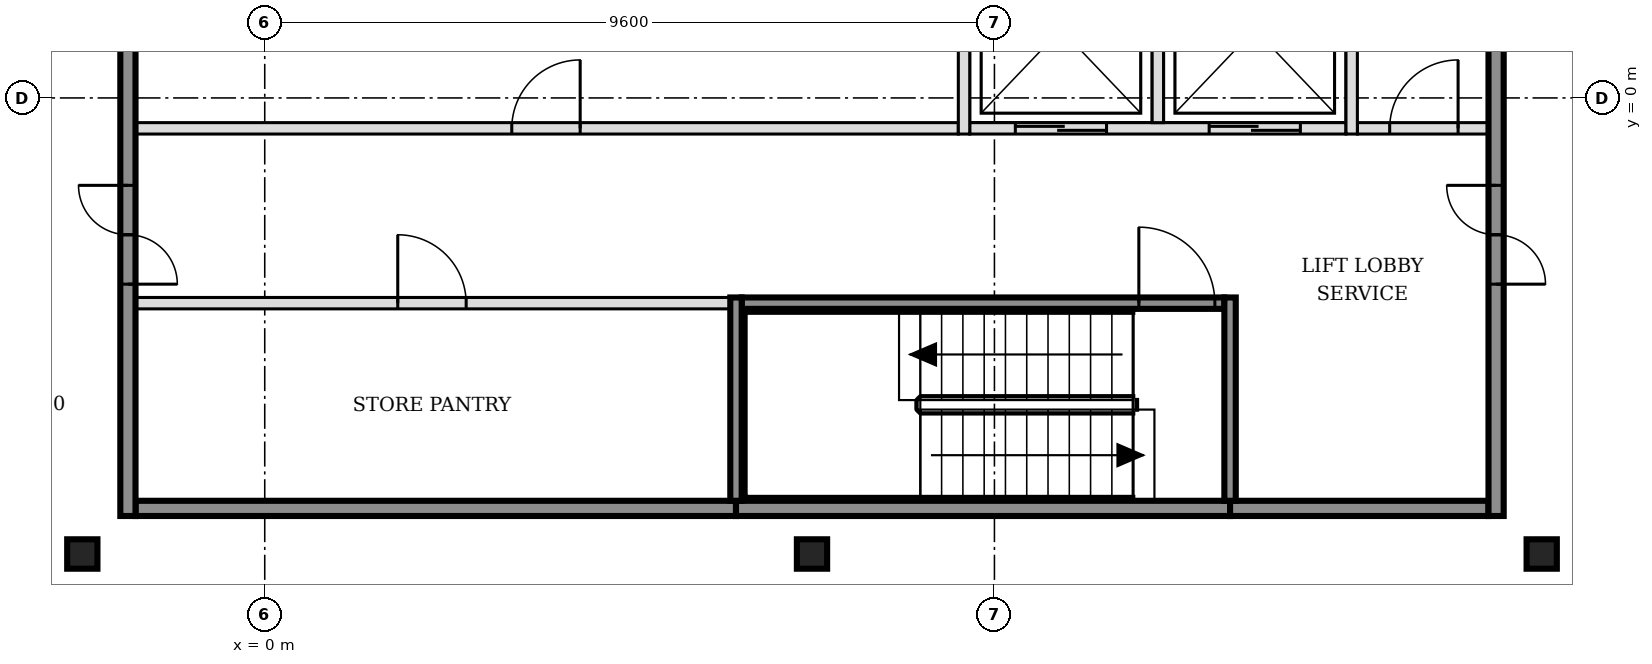
"""IFC4 building model, lengths in metres.
Left out: names, types, materials, properties, quantities, classifications, styles, units other than length and angle.
Written with IfcOpenShell. Run it as: python <this file> out.ifc"""

import sys

from ifc_helpers import new_model, si_unit, direction, frame, frame_2d, origin, origin_2d, place, context, subcontext, project, spatial, rectangle, i_section, extrude, element, fill, save


model = new_model("IFC4")
c1 = context("Model", 3, precision=1e-05, world=origin(), true_north=direction((0.0, 1.0)))
c2 = subcontext(c1, "Body", "Model", "MODEL_VIEW")
j1 = project(units=[si_unit("LENGTHUNIT", "METRE"), si_unit("PLANEANGLEUNIT", "RADIAN")], contexts=[c1])
p1 = place(None, origin())
s1 = spatial("IfcSite", under=j1, at=p1, CompositionType="ELEMENT")
p2 = place(p1, origin())
s2 = spatial("IfcBuilding", under=s1, at=p2, CompositionType="ELEMENT")
p3 = place(p2, frame((0.0, 0.0, 250.2)))
s3 = spatial("IfcBuildingStorey", under=s2, at=p3, CompositionType="ELEMENT", Elevation=250.2)
for number, where, z_axis, x_axis in (
    (1, (-2.4, -6.0, -0.15), (0.0, 0.0, 1.0), (1.0, 0.0, 0.0)),
    (2, (7.2, -6.0, -0.15), (0.0, 0.0, 1.0), (1.0, 0.0, 0.0)),
    (3, (16.8, -6.0, -0.15), (0.0, 0.0, 1.0), (1.0, 0.0, 0.0)),
):
    element("IfcColumn", number, at=place(p3, frame(where, z_axis=z_axis, x_axis=x_axis)), inside=s3, PredefinedType="COLUMN", context=c2, shape_type="SweptSolid", body=[
        extrude(i_section(OverallWidth=0.398, OverallDepth=0.387, WebThickness=0.021, FlangeThickness=0.033, FilletRadius=0.015, at=origin_2d()), origin(), (0.0, 0.0, 1.0), 3.6),
    ])
p4 = place(p3, frame((-1.7, -5.4, 0.0), z_axis=(0.0, 0.0, 1.0), x_axis=(1.0, 0.0, 0.0)))
e4 = element("IfcWall", 4, at=p4, inside=s3, PredefinedType="SOLIDWALL", context=c2, shape_type="SweptSolid", body=[
    extrude(rectangle(XDim=7.9, YDim=0.2, at=frame_2d((3.95, 0.0))), origin(), (0.0, 0.0, 1.0), 3.45),
])
p5 = place(p3, frame((6.2, -5.4, 0.0), z_axis=(0.0, 0.0, 1.0), x_axis=(1.0, 0.0, 0.0)))
e5 = element("IfcWall", 5, at=p5, inside=s3, PredefinedType="SOLIDWALL", context=c2, shape_type="SweptSolid", body=[
    extrude(rectangle(XDim=6.5, YDim=0.2, at=frame_2d((3.25, 0.0))), origin(), (0.0, 0.0, 1.0), 3.45),
])
p6 = place(p3, frame((12.7, -5.4, 0.0), z_axis=(0.0, 0.0, 1.0), x_axis=(1.0, 0.0, 0.0)))
e6 = element("IfcWall", 6, at=p6, inside=s3, PredefinedType="SOLIDWALL", context=c2, shape_type="SweptSolid", body=[
    extrude(rectangle(XDim=3.4, YDim=0.2, at=frame_2d((1.7, 0.0))), origin(), (0.0, 0.0, 1.0), 3.45),
])
p7 = place(p3, frame((-1.7, -2.7, 0.0), z_axis=(0.0, 0.0, 1.0), x_axis=(1.0, 0.0, 0.0)))
e7 = element("IfcWall", 7, at=p7, inside=s3, PredefinedType="PARTITIONING", context=c2, shape_type="SweptSolid", body=[
    extrude(rectangle(XDim=7.825, YDim=0.15, at=frame_2d((3.913, 0.0))), origin(), (0.0, 0.0, 1.0), 3.45),
])
p8 = place(p7, frame((3.45, 0.0, 0.0)))
e8 = element("IfcOpeningElement", 8, at=p8, cuts=e7, PredefinedType="OPENING", context=c2, shape_type="SweptSolid", body=[
    extrude(rectangle(XDim=0.9, YDim=2.1, at=frame_2d((0.45, 1.05))), frame((0.0, 0.085, 0.0), z_axis=(0.0, -1.0, 0.0), x_axis=(1.0, 0.0, 0.0)), (0.0, 0.0, 1.0), 0.17),
])
p9 = place(p3, frame((6.275, -2.7, 0.0), z_axis=(0.0, 0.0, 1.0), x_axis=(1.0, 0.0, 0.0)))
e9 = element("IfcWall", 9, at=p9, inside=s3, PredefinedType="SOLIDWALL", context=c2, shape_type="SweptSolid", body=[
    extrude(rectangle(XDim=6.35, YDim=0.15, at=frame_2d((3.175, 0.0))), origin(), (0.0, 0.0, 1.0), 3.45),
])
p10 = place(p9, frame((5.225, 0.0, 0.0)))
e10 = element("IfcOpeningElement", 10, at=p10, cuts=e9, PredefinedType="OPENING", context=c2, shape_type="SweptSolid", body=[
    extrude(rectangle(XDim=1.0, YDim=2.1, at=frame_2d((0.5, 1.05))), frame((0.0, 0.085, 0.0), z_axis=(0.0, -1.0, 0.0), x_axis=(1.0, 0.0, 0.0)), (0.0, 0.0, 1.0), 0.17),
])
p11 = place(p3, frame((-1.7, -0.4, 0.0), z_axis=(0.0, 0.0, 1.0), x_axis=(1.0, 0.0, 0.0)))
e11 = element("IfcWall", 11, at=p11, inside=s3, PredefinedType="PARTITIONING", context=c2, shape_type="SweptSolid", body=[
    extrude(rectangle(XDim=10.825, YDim=0.15, at=frame_2d((5.413, 0.0))), origin(), (0.0, 0.0, 1.0), 3.45),
])
p12 = place(p11, frame((4.95, 0.0, 0.0)))
e12 = element("IfcOpeningElement", 12, at=p12, cuts=e11, PredefinedType="OPENING", context=c2, shape_type="SweptSolid", body=[
    extrude(rectangle(XDim=0.9, YDim=2.1, at=frame_2d((0.45, 1.05))), frame((0.0, 0.085, 0.0), z_axis=(0.0, -1.0, 0.0), x_axis=(1.0, 0.0, 0.0)), (0.0, 0.0, 1.0), 0.17),
])
p13 = place(p3, frame((9.275, -0.4, 0.0), z_axis=(0.0, 0.0, 1.0), x_axis=(1.0, 0.0, 0.0)))
e13 = element("IfcWall", 13, at=p13, inside=s3, PredefinedType="SOLIDWALL", context=c2, shape_type="SweptSolid", body=[
    extrude(rectangle(XDim=4.95, YDim=0.15, at=frame_2d((2.475, 0.0))), origin(), (0.0, 0.0, 1.0), 3.45),
])
p14 = place(p13, frame((0.6, 0.0, 0.0)))
e14 = element("IfcOpeningElement", 14, at=p14, cuts=e13, PredefinedType="OPENING", context=c2, shape_type="SweptSolid", body=[
    extrude(rectangle(XDim=1.2, YDim=2.1, at=frame_2d((0.6, 1.05))), frame((0.0, 0.085, 0.0), z_axis=(0.0, -1.0, 0.0), x_axis=(1.0, 0.0, 0.0)), (0.0, 0.0, 1.0), 0.17),
])
p15 = place(p13, frame((3.15, 0.0, 0.0)))
e15 = element("IfcOpeningElement", 15, at=p15, cuts=e13, PredefinedType="OPENING", context=c2, shape_type="SweptSolid", body=[
    extrude(rectangle(XDim=1.2, YDim=2.1, at=frame_2d((0.6, 1.05))), frame((0.0, 0.085, 0.0), z_axis=(0.0, -1.0, 0.0), x_axis=(1.0, 0.0, 0.0)), (0.0, 0.0, 1.0), 0.17),
])
p16 = place(p3, frame((14.375, -0.4, 0.0), z_axis=(0.0, 0.0, 1.0), x_axis=(1.0, 0.0, 0.0)))
e16 = element("IfcWall", 16, at=p16, inside=s3, PredefinedType="PARTITIONING", context=c2, shape_type="SweptSolid", body=[
    extrude(rectangle(XDim=1.725, YDim=0.15, at=frame_2d((0.863, 0.0))), origin(), (0.0, 0.0, 1.0), 3.45),
])
p17 = place(p16, frame((0.425, 0.0, 0.0)))
e17 = element("IfcOpeningElement", 17, at=p17, cuts=e16, PredefinedType="OPENING", context=c2, shape_type="SweptSolid", body=[
    extrude(rectangle(XDim=0.9, YDim=2.1, at=frame_2d((0.45, 1.05))), frame((0.0, 0.085, 0.0), z_axis=(0.0, -1.0, 0.0), x_axis=(1.0, 0.0, 0.0)), (0.0, 0.0, 1.0), 0.17),
])
p18 = place(p3, frame((-1.8, -5.5, 0.0), z_axis=(0.0, 0.0, 1.0), x_axis=(0.0, 1.0, 0.0)))
e18 = element("IfcWall", 18, at=p18, inside=s3, PredefinedType="SOLIDWALL", context=c2, shape_type="SweptSolid", body=[
    extrude(rectangle(XDim=15.8, YDim=0.2, at=frame_2d((7.9, 0.0))), origin(), (0.0, 0.0, 1.0), 3.45),
])
p19 = place(p18, frame((3.05, 0.0, 0.0)))
e19 = element("IfcOpeningElement", 19, at=p19, cuts=e18, PredefinedType="OPENING", context=c2, shape_type="SweptSolid", body=[
    extrude(rectangle(XDim=1.3, YDim=2.1, at=frame_2d((0.65, 1.05))), frame((0.0, 0.11, 0.0), z_axis=(0.0, -1.0, 0.0), x_axis=(1.0, 0.0, 0.0)), (0.0, 0.0, 1.0), 0.22),
])
p20 = place(p18, frame((11.45, 0.0, 0.0)))
e20 = element("IfcOpeningElement", 20, at=p20, cuts=e18, PredefinedType="OPENING", context=c2, shape_type="SweptSolid", body=[
    extrude(rectangle(XDim=1.3, YDim=2.1, at=frame_2d((0.65, 1.05))), frame((0.0, 0.11, 0.0), z_axis=(0.0, -1.0, 0.0), x_axis=(1.0, 0.0, 0.0)), (0.0, 0.0, 1.0), 0.22),
])
p21 = place(p3, frame((6.2, -5.3, 0.0), z_axis=(0.0, 0.0, 1.0), x_axis=(0.0, 1.0, 0.0)))
e21 = element("IfcWall", 21, at=p21, inside=s3, PredefinedType="SOLIDWALL", context=c2, shape_type="SweptSolid", body=[
    extrude(rectangle(XDim=2.675, YDim=0.15, at=frame_2d((1.337, 0.0))), origin(), (0.0, 0.0, 1.0), 3.45),
])
p22 = place(p3, frame((9.2, -0.475, 0.0), z_axis=(0.0, 0.0, 1.0), x_axis=(0.0, 1.0, 0.0)))
e22 = element("IfcWall", 22, at=p22, inside=s3, PredefinedType="SOLIDWALL", context=c2, shape_type="SweptSolid", body=[
    extrude(rectangle(XDim=2.6, YDim=0.15, at=frame_2d((1.3, 0.0))), origin(), (0.0, 0.0, 1.0), 3.45),
])
p23 = place(p3, frame((11.75, -0.325, 0.0), z_axis=(0.0, 0.0, 1.0), x_axis=(0.0, 1.0, 0.0)))
e23 = element("IfcWall", 23, at=p23, inside=s3, PredefinedType="SOLIDWALL", context=c2, shape_type="SweptSolid", body=[
    extrude(rectangle(XDim=2.45, YDim=0.15, at=frame_2d((1.225, 0.0))), origin(), (0.0, 0.0, 1.0), 3.45),
])
p24 = place(p3, frame((12.7, -5.3, 0.0), z_axis=(0.0, 0.0, 1.0), x_axis=(0.0, 1.0, 0.0)))
e24 = element("IfcWall", 24, at=p24, inside=s3, PredefinedType="SOLIDWALL", context=c2, shape_type="SweptSolid", body=[
    extrude(rectangle(XDim=2.675, YDim=0.15, at=frame_2d((1.337, 0.0))), origin(), (0.0, 0.0, 1.0), 3.45),
])
p25 = place(p3, frame((14.3, -0.475, 0.0), z_axis=(0.0, 0.0, 1.0), x_axis=(0.0, 1.0, 0.0)))
e25 = element("IfcWall", 25, at=p25, inside=s3, PredefinedType="SOLIDWALL", context=c2, shape_type="SweptSolid", body=[
    extrude(rectangle(XDim=2.75, YDim=0.15, at=frame_2d((1.375, 0.0))), origin(), (0.0, 0.0, 1.0), 3.45),
])
p26 = place(p3, frame((16.2, -5.5, 0.0), z_axis=(0.0, 0.0, 1.0), x_axis=(0.0, 1.0, 0.0)))
e26 = element("IfcWall", 26, at=p26, inside=s3, PredefinedType="SOLIDWALL", context=c2, shape_type="SweptSolid", body=[
    extrude(rectangle(XDim=15.8, YDim=0.2, at=frame_2d((7.9, 0.0))), origin(), (0.0, 0.0, 1.0), 3.45),
])
p27 = place(p26, frame((3.05, 0.0, 0.0)))
e27 = element("IfcOpeningElement", 27, at=p27, cuts=e26, PredefinedType="OPENING", context=c2, shape_type="SweptSolid", body=[
    extrude(rectangle(XDim=1.3, YDim=2.1, at=frame_2d((0.65, 1.05))), frame((0.0, 0.11, 0.0), z_axis=(0.0, -1.0, 0.0), x_axis=(1.0, 0.0, 0.0)), (0.0, 0.0, 1.0), 0.22),
])
p28 = place(p26, frame((11.45, 0.0, 0.0)))
e28 = element("IfcOpeningElement", 28, at=p28, cuts=e26, PredefinedType="OPENING", context=c2, shape_type="SweptSolid", body=[
    extrude(rectangle(XDim=1.3, YDim=2.1, at=frame_2d((0.65, 1.05))), frame((0.0, 0.11, 0.0), z_axis=(0.0, -1.0, 0.0), x_axis=(1.0, 0.0, 0.0)), (0.0, 0.0, 1.0), 0.22),
])
p29 = place(p14, origin())
e29 = element("IfcDoor", 29, at=p29, inside=s3, OperationType="DOUBLE_DOOR_SLIDING", PredefinedType="DOOR", context=c2, shape_type="SweptSolid", body=[
    extrude(rectangle(XDim=1.2, YDim=2.1, at=frame_2d((0.6, 1.05))), frame((0.0, 0.025, 0.0), z_axis=(0.0, -1.0, 0.0), x_axis=(1.0, 0.0, 0.0)), (0.0, 0.0, 1.0), 0.05),
])
fill(e14, e29)
p30 = place(p15, origin())
e30 = element("IfcDoor", 30, at=p30, inside=s3, OperationType="DOUBLE_DOOR_SLIDING", PredefinedType="DOOR", context=c2, shape_type="SweptSolid", body=[
    extrude(rectangle(XDim=1.2, YDim=2.1, at=frame_2d((0.6, 1.05))), frame((0.0, 0.025, 0.0), z_axis=(0.0, -1.0, 0.0), x_axis=(1.0, 0.0, 0.0)), (0.0, 0.0, 1.0), 0.05),
])
fill(e15, e30)
p31 = place(p10, origin())
e31 = element("IfcDoor", 31, at=p31, inside=s3, OperationType="SINGLE_SWING_LEFT", PredefinedType="DOOR", context=c2, shape_type="SweptSolid", body=[
    extrude(rectangle(XDim=1.0, YDim=2.1, at=frame_2d((0.5, 1.05))), frame((0.0, 0.025, 0.0), z_axis=(0.0, -1.0, 0.0), x_axis=(1.0, 0.0, 0.0)), (0.0, 0.0, 1.0), 0.05),
])
fill(e10, e31)
p32 = place(p19, origin())
e32 = element("IfcDoor", 32, at=p32, inside=s3, OperationType="DOUBLE_DOOR_SINGLE_SWING", PredefinedType="DOOR", context=c2, shape_type="SweptSolid", body=[
    extrude(rectangle(XDim=1.3, YDim=2.1, at=frame_2d((0.65, 1.05))), frame((0.0, 0.025, 0.0), z_axis=(0.0, -1.0, 0.0), x_axis=(1.0, 0.0, 0.0)), (0.0, 0.0, 1.0), 0.05),
])
fill(e19, e32)
p33 = place(p27, origin())
e33 = element("IfcDoor", 33, at=p33, inside=s3, OperationType="DOUBLE_DOOR_SINGLE_SWING", PredefinedType="DOOR", context=c2, shape_type="SweptSolid", body=[
    extrude(rectangle(XDim=1.3, YDim=2.1, at=frame_2d((0.65, 1.05))), frame((0.0, 0.025, 0.0), z_axis=(0.0, -1.0, 0.0), x_axis=(1.0, 0.0, 0.0)), (0.0, 0.0, 1.0), 0.05),
])
fill(e27, e33)
p34 = place(p17, origin())
e34 = element("IfcDoor", 34, at=p34, inside=s3, OperationType="SINGLE_SWING_RIGHT", PredefinedType="DOOR", context=c2, shape_type="SweptSolid", body=[
    extrude(rectangle(XDim=0.9, YDim=2.1, at=frame_2d((0.45, 1.05))), frame((0.0, 0.025, 0.0), z_axis=(0.0, -1.0, 0.0), x_axis=(1.0, 0.0, 0.0)), (0.0, 0.0, 1.0), 0.05),
])
fill(e17, e34)
p35 = place(p8, origin())
e35 = element("IfcDoor", 35, at=p35, inside=s3, OperationType="SINGLE_SWING_LEFT", PredefinedType="DOOR", context=c2, shape_type="SweptSolid", body=[
    extrude(rectangle(XDim=0.9, YDim=2.1, at=frame_2d((0.45, 1.05))), frame((0.0, 0.025, 0.0), z_axis=(0.0, -1.0, 0.0), x_axis=(1.0, 0.0, 0.0)), (0.0, 0.0, 1.0), 0.05),
])
fill(e8, e35)
p36 = place(p12, origin())
e36 = element("IfcDoor", 36, at=p36, inside=s3, OperationType="SINGLE_SWING_RIGHT", PredefinedType="DOOR", context=c2, shape_type="SweptSolid", body=[
    extrude(rectangle(XDim=0.9, YDim=2.1, at=frame_2d((0.45, 1.05))), frame((0.0, 0.025, 0.0), z_axis=(0.0, -1.0, 0.0), x_axis=(1.0, 0.0, 0.0)), (0.0, 0.0, 1.0), 0.05),
])
fill(e12, e36)
save(model, sys.argv[1])
